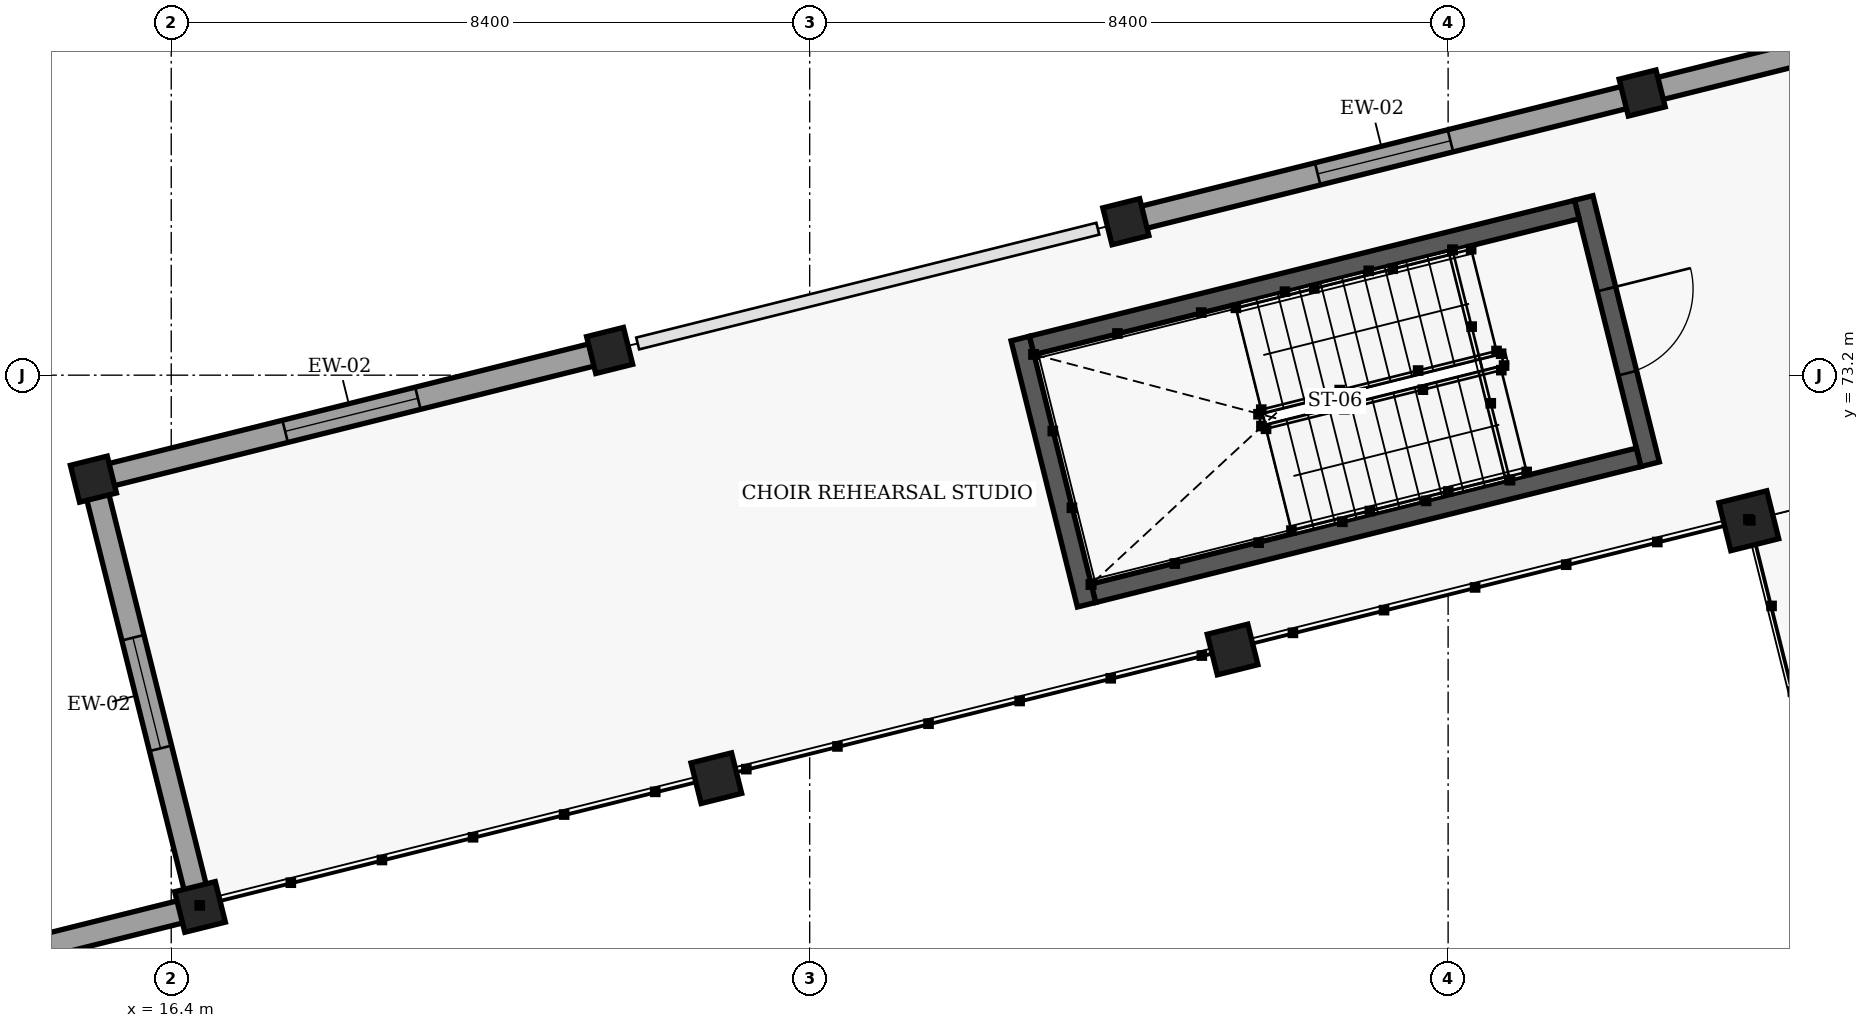
"""IFC4 building model, lengths in metres.
Left out: names, types, materials, properties, quantities, classifications, styles, units other than length and angle.
Written with IfcOpenShell. Run it as: python <this file> out.ifc"""

import sys

from ifc_helpers import new_model, si_unit, direction, frame, frame_2d, origin, origin_2d, place, context, subcontext, project, spatial, rectangle, extrude, element, fill, save


model = new_model("IFC4")
c1 = context("Model", 3, precision=1e-05, world=origin(), true_north=direction((0.0, 1.0)))
c2 = subcontext(c1, "Body", "Model", "MODEL_VIEW")
j1 = project(units=[si_unit("LENGTHUNIT", "METRE"), si_unit("PLANEANGLEUNIT", "RADIAN")], contexts=[c1])
p1 = place(None, origin())
s1 = spatial("IfcSite", under=j1, at=p1, CompositionType="ELEMENT")
p2 = place(p1, origin())
s2 = spatial("IfcBuilding", under=s1, at=p2, CompositionType="ELEMENT")
p3 = place(p2, frame((0.0, 0.0, 4.8)))
s3 = spatial("IfcBuildingStorey", under=s2, at=p3, CompositionType="ELEMENT", Elevation=4.8)
p4 = place(p3, frame((37.156, 71.285, 0.0), z_axis=(0.0, 0.0, 1.0), x_axis=(0.970295726276, 0.2419218956, 0.0)))
e1 = element("IfcColumn", 1, at=p4, inside=s3, PredefinedType="COLUMN", context=c2, shape_type="SweptSolid", body=[
    extrude(rectangle(XDim=0.65, YDim=0.65, at=origin_2d()), origin(), (0.0, 0.0, 1.0), 4.2),
])
for number, where, z_axis, x_axis in (
    (2, (16.779, 66.204, 0.0), (0.0, 0.0, 1.0), (0.97, 0.242, 0.0)),
    (3, (23.572, 67.898, 0.0), (0.0, 0.0, 1.0), (0.97, 0.242, 0.0)),
    (4, (30.364, 69.591, 0.0), (0.0, 0.0, 1.0), (0.97, 0.242, 0.0)),
):
    element("IfcColumn", number, at=place(p3, frame(where, z_axis=z_axis, x_axis=x_axis)), inside=s3, PredefinedType="COLUMN", context=c2, shape_type="SweptSolid", body=[
        extrude(rectangle(XDim=0.55, YDim=0.55, at=origin_2d()), origin(), (0.0, 0.0, 1.0), 4.2),
    ])
for number, where, z_axis, x_axis in (
    (5, (15.376, 71.832, 0.0), (0.0, 0.0, 1.0), (0.97, 0.242, 0.0)),
    (6, (22.168, 73.525, 0.0), (0.0, 0.0, 1.0), (0.97, 0.242, 0.0)),
    (7, (28.96, 75.219, 0.0), (0.0, 0.0, 1.0), (0.97, 0.242, 0.0)),
    (8, (35.753, 76.912, 0.0), (0.0, 0.0, 1.0), (0.97, 0.242, 0.0)),
):
    element("IfcColumn", number, at=place(p3, frame(where, z_axis=z_axis, x_axis=x_axis)), inside=s3, PredefinedType="COLUMN", context=c2, shape_type="SweptSolid", body=[
        extrude(rectangle(XDim=0.5, YDim=0.5, at=origin_2d()), origin(), (0.0, 0.0, 1.0), 4.2),
    ])
p5 = place(p3, frame((10.065, 64.53, 0.0), z_axis=(0.0, 0.0, 1.0), x_axis=(0.97027883487, 0.241989633258, 0.0)))
e9 = element("IfcWall", 9, at=p5, inside=s3, PredefinedType="SOLIDWALL", context=c2, shape_type="SweptSolid", body=[
    extrude(rectangle(XDim=6.839, YDim=0.3, at=frame_2d((3.42, 0.0))), origin(), (0.0, 0.0, 1.0), 3.485),
])
p6 = place(p5, frame((2.67, 0.0, 0.9)))
e10 = element("IfcOpeningElement", 10, at=p6, cuts=e9, PredefinedType="OPENING", context=c2, shape_type="SweptSolid", body=[
    extrude(rectangle(XDim=1.5, YDim=1.5, at=frame_2d((0.75, 0.75))), frame((0.0, 0.16, 0.0), z_axis=(0.0, -1.0, 0.0), x_axis=(1.0, 0.0, 0.0)), (0.0, 0.0, 1.0), 0.32),
])
p7 = place(p3, frame((16.76, 66.282, 0.0), z_axis=(0.0, 0.0, 1.0), x_axis=(-0.242036480393, 0.970267149892, 0.0)))
e11 = element("IfcWall", 11, at=p7, inside=s3, PredefinedType="SOLIDWALL", context=c2, shape_type="SweptSolid", body=[
    extrude(rectangle(XDim=5.64, YDim=0.3, at=frame_2d((2.82, 0.0))), origin(), (0.0, 0.0, 1.0), 3.495),
])
p8 = place(p7, frame((2.07, 0.0, 0.9)))
e12 = element("IfcOpeningElement", 12, at=p8, cuts=e11, PredefinedType="OPENING", context=c2, shape_type="SweptSolid", body=[
    extrude(rectangle(XDim=1.5, YDim=1.5, at=frame_2d((0.75, 0.75))), frame((0.0, 0.16, 0.0), z_axis=(0.0, -1.0, 0.0), x_axis=(1.0, 0.0, 0.0)), (0.0, 0.0, 1.0), 0.32),
])
p9 = place(p3, frame((15.473, 71.856, 0.0), z_axis=(0.0, 0.0, 1.0), x_axis=(0.970298579828, 0.24191045034, 0.0)))
e13 = element("IfcWall", 13, at=p9, inside=s3, PredefinedType="SOLIDWALL", context=c2, shape_type="SweptSolid", body=[
    extrude(rectangle(XDim=6.8, YDim=0.3, at=frame_2d((3.4, 0.0))), origin(), (0.0, 0.0, 1.0), 3.465),
])
p10 = place(p9, frame((2.5, 0.0, 0.9)))
e14 = element("IfcOpeningElement", 14, at=p10, cuts=e13, PredefinedType="OPENING", context=c2, shape_type="SweptSolid", body=[
    extrude(rectangle(XDim=1.8, YDim=1.5, at=frame_2d((0.9, 0.75))), frame((0.0, 0.16, 0.0), z_axis=(0.0, -1.0, 0.0), x_axis=(1.0, 0.0, 0.0)), (0.0, 0.0, 1.0), 0.32),
])
p11 = place(p3, frame((29.058, 75.243, 0.0), z_axis=(0.0, 0.0, 1.0), x_axis=(0.970296478685, 0.241918877831, 0.0)))
e15 = element("IfcWall", 15, at=p11, inside=s3, PredefinedType="SOLIDWALL", context=c2, shape_type="SweptSolid", body=[
    extrude(rectangle(XDim=6.8, YDim=0.3, at=frame_2d((3.4, 0.0))), origin(), (0.0, 0.0, 1.0), 3.465),
])
p12 = place(p11, frame((2.5, 0.0, 0.9)))
e16 = element("IfcOpeningElement", 16, at=p12, cuts=e15, PredefinedType="OPENING", context=c2, shape_type="SweptSolid", body=[
    extrude(rectangle(XDim=1.8, YDim=1.5, at=frame_2d((0.9, 0.75))), frame((0.0, 0.16, 0.0), z_axis=(0.0, -1.0, 0.0), x_axis=(1.0, 0.0, 0.0)), (0.0, 0.0, 1.0), 0.32),
])
p13 = place(p3, frame((35.85, 76.937, 0.0), z_axis=(0.0, 0.0, 1.0), x_axis=(0.97029090175, 0.241941244896, 0.0)))
e17 = element("IfcWall", 17, at=p13, inside=s3, PredefinedType="SOLIDWALL", context=c2, shape_type="SweptSolid", body=[
    extrude(rectangle(XDim=5.799, YDim=0.3, at=frame_2d((2.9, 0.0))), origin(), (0.0, 0.0, 1.0), 3.465),
])
p14 = place(p13, frame((2.0, 0.0, 0.9)))
e18 = element("IfcOpeningElement", 18, at=p14, cuts=e17, PredefinedType="OPENING", context=c2, shape_type="SweptSolid", body=[
    extrude(rectangle(XDim=1.8, YDim=1.5, at=frame_2d((0.9, 0.75))), frame((0.0, 0.16, 0.0), z_axis=(0.0, -1.0, 0.0), x_axis=(1.0, 0.0, 0.0)), (0.0, 0.0, 1.0), 0.32),
])
p15 = place(p3, frame((34.984, 75.531, 0.0), z_axis=(0.0, 0.0, 1.0), x_axis=(0.242090083699, -0.97025377679, 0.0)))
e19 = element("IfcWall", 19, at=p15, inside=s3, PredefinedType="SHEAR", context=c2, shape_type="SweptSolid", body=[
    extrude(rectangle(XDim=3.61, YDim=0.25, at=frame_2d((1.805, 0.0))), origin(), (0.0, 0.0, 1.0), 3.96),
])
p16 = place(p15, frame((1.235, 0.0, 0.0)))
e20 = element("IfcOpeningElement", 20, at=p16, cuts=e19, PredefinedType="OPENING", context=c2, shape_type="SweptSolid", body=[
    extrude(rectangle(XDim=1.14, YDim=2.15, at=frame_2d((0.57, 1.075))), frame((0.0, 0.135, 0.0), z_axis=(0.0, -1.0, 0.0), x_axis=(1.0, 0.0, 0.0)), (0.0, 0.0, 1.0), 0.27),
])
p17 = place(p3, frame((28.444, 70.18, 0.0), z_axis=(0.0, 0.0, 1.0), x_axis=(-0.241898912952, 0.970301456204, 0.0)))
e21 = element("IfcWall", 21, at=p17, inside=s3, PredefinedType="SHEAR", context=c2, shape_type="SweptSolid", body=[
    extrude(rectangle(XDim=3.609, YDim=0.25, at=frame_2d((1.805, 0.0))), origin(), (0.0, 0.0, 1.0), 3.96),
])
p18 = place(p3, frame((35.706, 72.119, 0.0), z_axis=(0.0, 0.0, 1.0), x_axis=(-0.970299691856, -0.241905989972, 0.0)))
e22 = element("IfcWall", 22, at=p18, inside=s3, PredefinedType="SHEAR", context=c2, shape_type="SweptSolid", body=[
    extrude(rectangle(XDim=7.391, YDim=0.25, at=frame_2d((3.695, 0.0))), origin(), (0.0, 0.0, 1.0), 3.96),
])
p19 = place(p3, frame((27.723, 73.591, 0.0), z_axis=(0.0, 0.0, 1.0), x_axis=(0.970291958031, 0.241937008705, 0.0)))
e23 = element("IfcWall", 23, at=p19, inside=s3, PredefinedType="SHEAR", context=c2, shape_type="SweptSolid", body=[
    extrude(rectangle(XDim=7.39, YDim=0.25, at=frame_2d((3.695, 0.0))), origin(), (0.0, 0.0, 1.0), 3.96),
])
p20 = place(p8, origin())
e24 = element("IfcWindow", 24, at=p20, inside=s3, PartitioningType="SINGLE_PANEL", PredefinedType="WINDOW", context=c2, shape_type="SweptSolid", body=[
    extrude(rectangle(XDim=1.5, YDim=1.5, at=frame_2d((0.75, 0.75))), frame((0.0, 0.03, 0.0), z_axis=(0.0, -1.0, 0.0), x_axis=(1.0, 0.0, 0.0)), (0.0, 0.0, 1.0), 0.06),
])
fill(e12, e24)
p21 = place(p10, origin())
e25 = element("IfcWindow", 25, at=p21, inside=s3, PartitioningType="SINGLE_PANEL", PredefinedType="WINDOW", context=c2, shape_type="SweptSolid", body=[
    extrude(rectangle(XDim=1.8, YDim=1.5, at=frame_2d((0.9, 0.75))), frame((0.0, 0.03, 0.0), z_axis=(0.0, -1.0, 0.0), x_axis=(1.0, 0.0, 0.0)), (0.0, 0.0, 1.0), 0.06),
])
fill(e14, e25)
p22 = place(p12, origin())
e26 = element("IfcWindow", 26, at=p22, inside=s3, PartitioningType="SINGLE_PANEL", PredefinedType="WINDOW", context=c2, shape_type="SweptSolid", body=[
    extrude(rectangle(XDim=1.8, YDim=1.5, at=frame_2d((0.9, 0.75))), frame((0.0, 0.03, 0.0), z_axis=(0.0, -1.0, 0.0), x_axis=(1.0, 0.0, 0.0)), (0.0, 0.0, 1.0), 0.06),
])
fill(e16, e26)
p23 = place(p16, origin())
e27 = element("IfcDoor", 27, at=p23, inside=s3, OperationType="SINGLE_SWING_LEFT", PredefinedType="DOOR", context=c2, shape_type="SweptSolid", body=[
    extrude(rectangle(XDim=1.14, YDim=2.15, at=frame_2d((0.57, 1.075))), frame((0.0, 0.025, 0.0), z_axis=(0.0, -1.0, 0.0), x_axis=(1.0, 0.0, 0.0)), (0.0, 0.0, 1.0), 0.05),
])
fill(e20, e27)
save(model, sys.argv[1])
